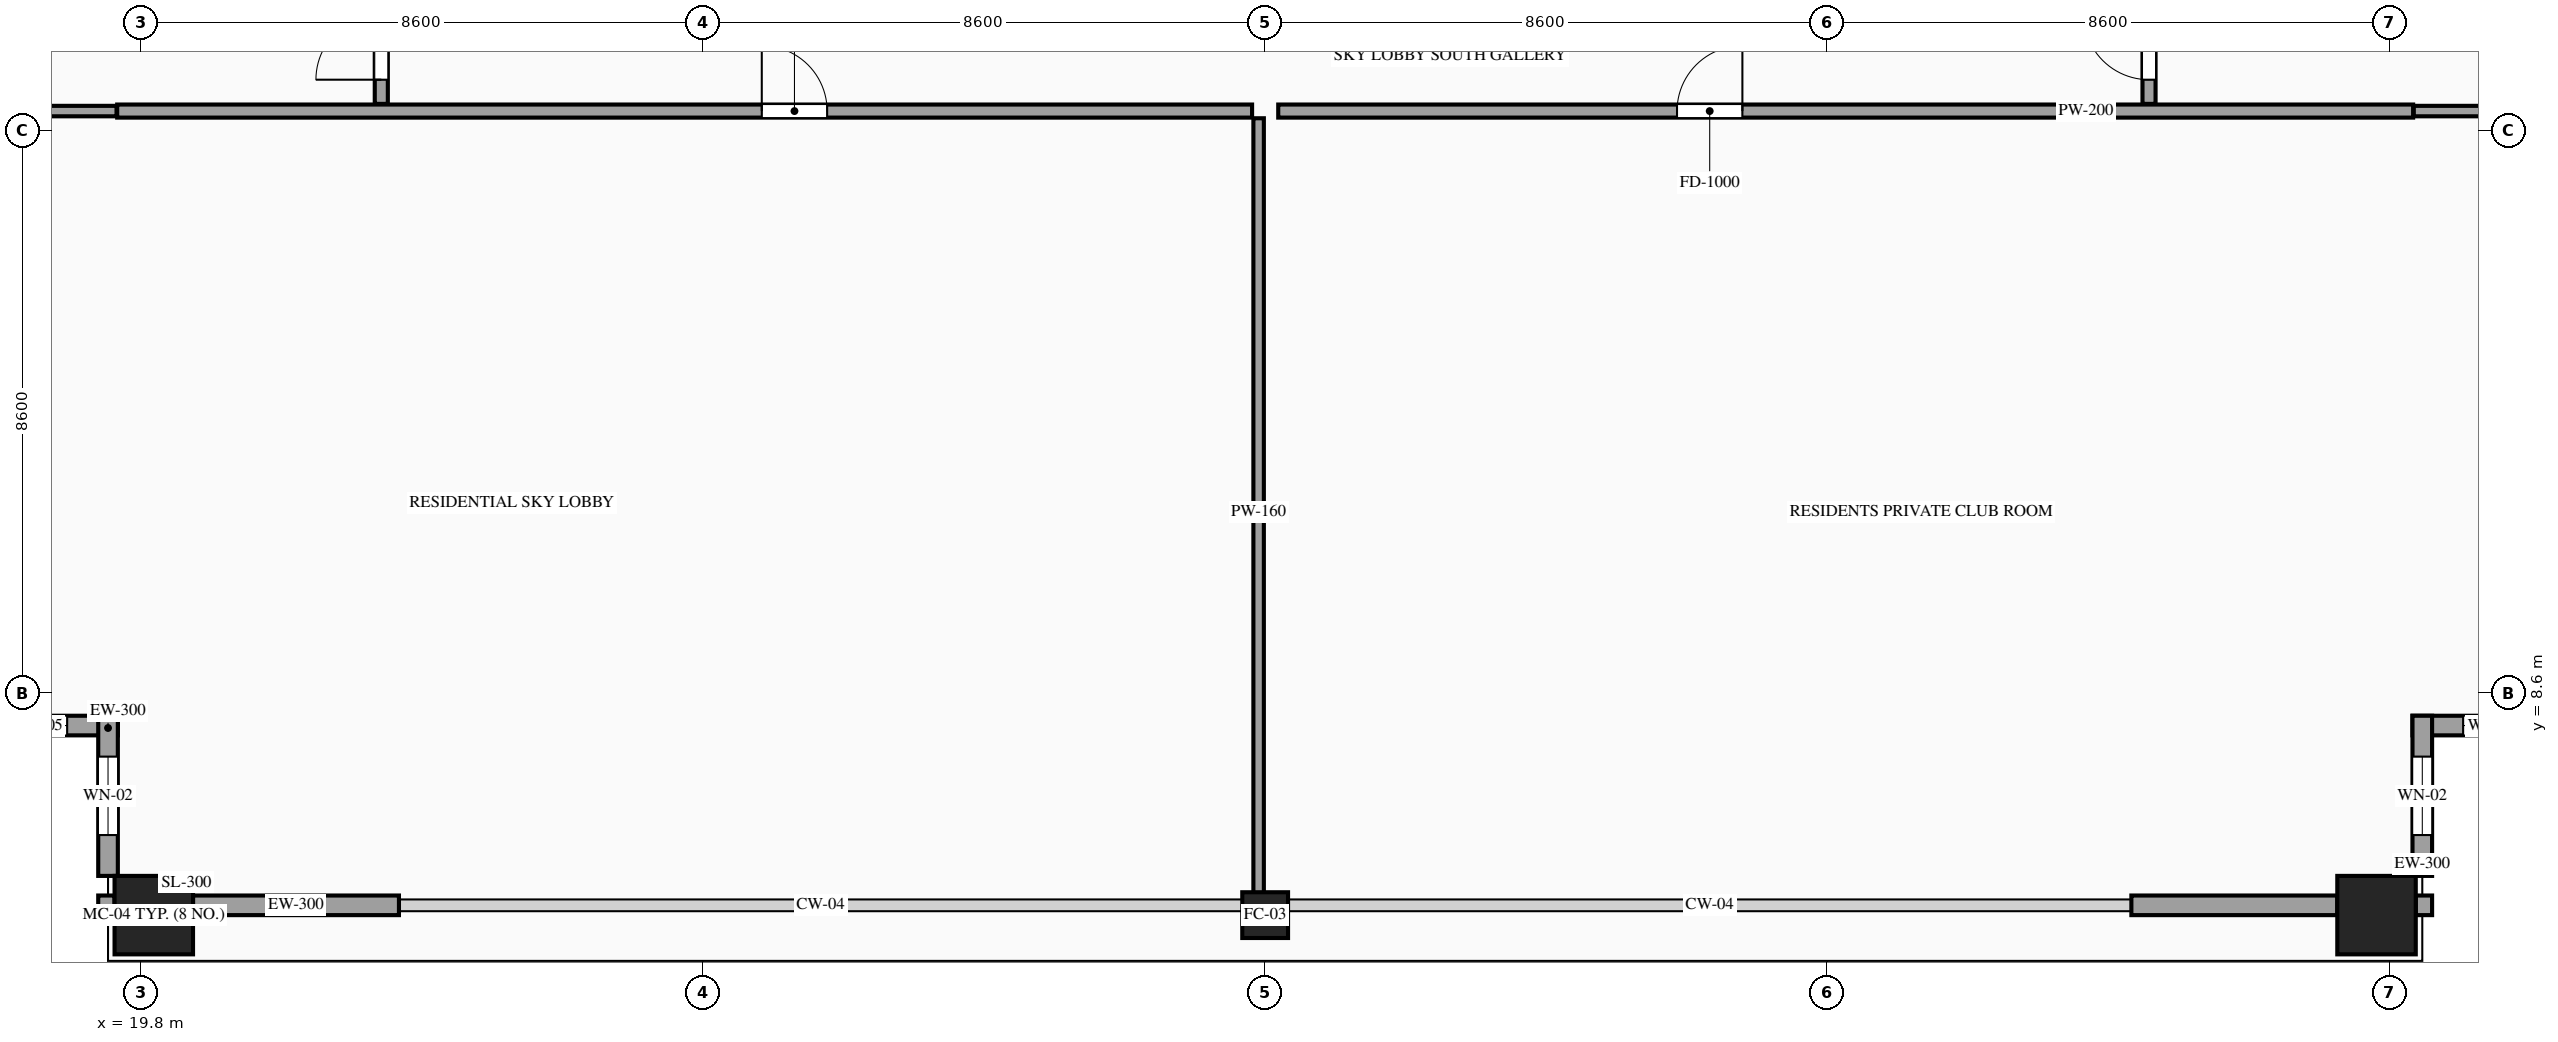
"""IFC4 building model, lengths in metres.
Left out: names, types, materials, properties, quantities, classifications, styles, units other than length and angle.
Written with IfcOpenShell. Run it as: python <this file> out.ifc"""

import sys

from ifc_helpers import new_model, si_unit, direction, frame, frame_2d, origin, origin_2d, place, context, subcontext, project, spatial, rectangle, hollow_rectangle, extrude, source, transform, mapped, element, fill, save


model = new_model("IFC4")
c1 = context("Model", 3, precision=1e-05, world=origin(), true_north=direction((0.0, 1.0)))
c2 = subcontext(c1, "Body", "Model", "MODEL_VIEW")
j1 = project(units=[si_unit("LENGTHUNIT", "METRE"), si_unit("PLANEANGLEUNIT", "RADIAN")], contexts=[c1])
p1 = place(None, origin())
s1 = spatial("IfcSite", under=j1, at=p1, CompositionType="ELEMENT")
p2 = place(p1, origin())
s2 = spatial("IfcBuilding", under=s1, at=p2, CompositionType="ELEMENT")
p3 = place(p2, frame((0.0, 0.0, 259.1)))
s3 = spatial("IfcBuildingStorey", under=s2, at=p3, CompositionType="ELEMENT", Elevation=259.1)
m1 = source(origin(), c2, "Body", "SweptSolid", [
    extrude(hollow_rectangle(XDim=1.2, YDim=1.2, WallThickness=0.055, at=origin_2d()), origin(), (0.0, 0.0, 1.0), 4.4),
])
p4 = place(p3, frame((20.0, 5.2, 0.0), z_axis=(0.0, 0.0, 1.0), x_axis=(1.0, 0.0, 0.0)))
e1 = element("IfcColumn", 1, at=p4, inside=s3, PredefinedType="COLUMN", context=c2, shape_type="MappedRepresentation", body=[
    mapped(m1, transform((0.0, 0.0, 0.0), scale=1.0)),
])
m2 = source(origin(), c2, "Body", "SweptSolid", [
    extrude(hollow_rectangle(XDim=0.7, YDim=0.7, WallThickness=0.032, at=origin_2d()), origin(), (0.0, 0.0, 1.0), 4.4),
])
p5 = place(p3, frame((37.0, 5.2, 0.0), z_axis=(0.0, 0.0, 1.0), x_axis=(1.0, 0.0, 0.0)))
e2 = element("IfcColumn", 2, at=p5, inside=s3, PredefinedType="COLUMN", context=c2, shape_type="MappedRepresentation", body=[
    mapped(m2, transform((0.0, 0.0, 0.0), scale=1.0)),
])
p6 = place(p3, frame((54.0, 5.2, 0.0), z_axis=(0.0, 0.0, 1.0), x_axis=(1.0, 0.0, 0.0)))
e3 = element("IfcColumn", 3, at=p6, inside=s3, PredefinedType="COLUMN", context=c2, shape_type="MappedRepresentation", body=[
    mapped(m1, transform((0.0, 0.0, 0.0), scale=1.0)),
])
p7 = place(p3, frame((17.0, 8.1, 0.0), z_axis=(0.0, 0.0, 1.0), x_axis=(1.0, 0.0, 0.0)))
e4 = element("IfcWall", 4, at=p7, inside=s3, PredefinedType="SOLIDWALL", context=c2, shape_type="SweptSolid", body=[
    extrude(rectangle(XDim=2.45, YDim=0.3, at=frame_2d((1.225, 0.0))), origin(), (0.0, 0.0, 1.0), 4.12),
])
p8 = place(p7, frame((0.775, 0.0, 0.85)))
e5 = element("IfcOpeningElement", 5, at=p8, cuts=e4, PredefinedType="OPENING", context=c2, shape_type="SweptSolid", body=[
    extrude(rectangle(XDim=0.9, YDim=1.5, at=frame_2d((0.45, 0.75))), frame((0.0, 0.165, 0.0), z_axis=(0.0, -1.0, 0.0), x_axis=(1.0, 0.0, 0.0)), (0.0, 0.0, 1.0), 0.33),
])
p9 = place(p3, frame((19.3, 8.25, 0.0), z_axis=(0.0, 0.0, 1.0), x_axis=(0.0, -1.0, 0.0)))
e6 = element("IfcWall", 6, at=p9, inside=s3, PredefinedType="SOLIDWALL", context=c2, shape_type="SweptSolid", body=[
    extrude(rectangle(XDim=2.45, YDim=0.3, at=frame_2d((1.225, 0.0))), origin(), (0.0, 0.0, 1.0), 4.12),
])
p10 = place(p9, frame((0.625, 0.0, 0.85)))
e7 = element("IfcOpeningElement", 7, at=p10, cuts=e6, PredefinedType="OPENING", context=c2, shape_type="SweptSolid", body=[
    extrude(rectangle(XDim=1.2, YDim=2.1, at=frame_2d((0.6, 1.05))), frame((0.0, 0.165, 0.0), z_axis=(0.0, -1.0, 0.0), x_axis=(1.0, 0.0, 0.0)), (0.0, 0.0, 1.0), 0.33),
])
p11 = place(p3, frame((54.55, 8.1, 0.0), z_axis=(0.0, 0.0, 1.0), x_axis=(1.0, 0.0, 0.0)))
e8 = element("IfcWall", 8, at=p11, inside=s3, PredefinedType="SOLIDWALL", context=c2, shape_type="SweptSolid", body=[
    extrude(rectangle(XDim=2.45, YDim=0.3, at=frame_2d((1.225, 0.0))), origin(), (0.0, 0.0, 1.0), 4.12),
])
p12 = place(p11, frame((0.775, 0.0, 0.85)))
e9 = element("IfcOpeningElement", 9, at=p12, cuts=e8, PredefinedType="OPENING", context=c2, shape_type="SweptSolid", body=[
    extrude(rectangle(XDim=0.9, YDim=1.5, at=frame_2d((0.45, 0.75))), frame((0.0, 0.165, 0.0), z_axis=(0.0, -1.0, 0.0), x_axis=(1.0, 0.0, 0.0)), (0.0, 0.0, 1.0), 0.33),
])
p13 = place(p3, frame((54.7, 5.8, 0.0), z_axis=(0.0, 0.0, 1.0), x_axis=(0.0, 1.0, 0.0)))
e10 = element("IfcWall", 10, at=p13, inside=s3, PredefinedType="SOLIDWALL", context=c2, shape_type="SweptSolid", body=[
    extrude(rectangle(XDim=2.45, YDim=0.3, at=frame_2d((1.225, 0.0))), origin(), (0.0, 0.0, 1.0), 4.12),
])
p14 = place(p13, frame((0.625, 0.0, 0.85)))
e11 = element("IfcOpeningElement", 11, at=p14, cuts=e10, PredefinedType="OPENING", context=c2, shape_type="SweptSolid", body=[
    extrude(rectangle(XDim=1.2, YDim=2.1, at=frame_2d((0.6, 1.05))), frame((0.0, 0.165, 0.0), z_axis=(0.0, -1.0, 0.0), x_axis=(1.0, 0.0, 0.0)), (0.0, 0.0, 1.0), 0.33),
])
m3 = source(origin(), c2, "Body", "SweptSolid", [
    extrude(rectangle(XDim=0.25, YDim=0.3, at=frame_2d((0.125, 0.0))), origin(), (0.0, 0.0, 1.0), 4.12),
])
for number, where, z_axis, x_axis in (
    (12, (19.15, 5.35, 0.0), (0.0, 0.0, 1.0), (1.0, 0.0, 0.0)),
    (13, (54.6, 5.35, 0.0), (0.0, 0.0, 1.0), (1.0, 0.0, 0.0)),
):
    element("IfcWall", number, at=place(p3, frame(where, z_axis=z_axis, x_axis=x_axis)), inside=s3, PredefinedType="SOLIDWALL", context=c2, shape_type="MappedRepresentation", body=[
        mapped(m3, transform((0.0, 0.0, 0.0), scale=1.0)),
    ])
m4 = source(origin(), c2, "Body", "SweptSolid", [
    extrude(rectangle(XDim=3.15, YDim=0.3, at=frame_2d((1.575, 0.0))), origin(), (0.0, 0.0, 1.0), 3.675),
])
for number, where, z_axis, x_axis in (
    (14, (20.6, 5.35, 0.0), (0.0, 0.0, 1.0), (1.0, 0.0, 0.0)),
    (15, (50.25, 5.35, 0.0), (0.0, 0.0, 1.0), (1.0, 0.0, 0.0)),
):
    element("IfcWall", number, at=place(p3, frame(where, z_axis=z_axis, x_axis=x_axis)), inside=s3, PredefinedType="SOLIDWALL", context=c2, shape_type="MappedRepresentation", body=[
        mapped(m4, transform((0.0, 0.0, 0.0), scale=1.0)),
    ])
p15 = place(p3, frame((19.44, 17.5, 0.0), z_axis=(0.0, 0.0, 1.0), x_axis=(1.0, 0.0, 0.0)))
e16 = element("IfcWall", 16, at=p15, inside=s3, PredefinedType="PARTITIONING", context=c2, shape_type="SweptSolid", body=[
    extrude(rectangle(XDim=17.36, YDim=0.2, at=frame_2d((8.68, 0.0))), origin(), (0.0, 0.0, 1.0), 4.12),
])
p16 = place(p15, frame((9.86, 0.0, 0.0)))
e17 = element("IfcOpeningElement", 17, at=p16, cuts=e16, PredefinedType="OPENING", context=c2, shape_type="SweptSolid", body=[
    extrude(rectangle(XDim=1.0, YDim=2.2, at=frame_2d((0.5, 1.1))), frame((0.0, 0.115, 0.0), z_axis=(0.0, -1.0, 0.0), x_axis=(1.0, 0.0, 0.0)), (0.0, 0.0, 1.0), 0.23),
])
m5 = source(origin(), c2, "Body", "SweptSolid", [
    extrude(rectangle(XDim=12.04, YDim=0.16, at=frame_2d((6.02, 0.0))), origin(), (0.0, 0.0, 1.0), 3.627),
])
p17 = place(p3, frame((36.9, 5.35, 0.0), z_axis=(0.0, 0.0, 1.0), x_axis=(0.0, 1.0, 0.0)))
e18 = element("IfcWall", 18, at=p17, inside=s3, PredefinedType="PARTITIONING", context=c2, shape_type="MappedRepresentation", body=[
    mapped(m5, transform((0.0, 0.0, 0.0), scale=1.0)),
])
p18 = place(p3, frame((37.2, 17.5, 0.0), z_axis=(0.0, 0.0, 1.0), x_axis=(1.0, 0.0, 0.0)))
e19 = element("IfcWall", 19, at=p18, inside=s3, PredefinedType="PARTITIONING", context=c2, shape_type="SweptSolid", body=[
    extrude(rectangle(XDim=17.36, YDim=0.2, at=frame_2d((8.68, 0.0))), origin(), (0.0, 0.0, 1.0), 4.12),
])
p19 = place(p18, frame((6.1, 0.0, 0.0)))
e20 = element("IfcOpeningElement", 20, at=p19, cuts=e19, PredefinedType="OPENING", context=c2, shape_type="SweptSolid", body=[
    extrude(rectangle(XDim=1.0, YDim=2.2, at=frame_2d((0.5, 1.1))), frame((0.0, 0.115, 0.0), z_axis=(0.0, -1.0, 0.0), x_axis=(1.0, 0.0, 0.0)), (0.0, 0.0, 1.0), 0.23),
])
p20 = place(p3, frame((23.48, 17.61, 0.0), z_axis=(0.0, 0.0, 1.0), x_axis=(0.0, 1.0, 0.0)))
e21 = element("IfcWall", 21, at=p20, inside=s3, PredefinedType="PARTITIONING", context=c2, shape_type="SweptSolid", body=[
    extrude(rectangle(XDim=1.74, YDim=0.2, at=frame_2d((0.87, 0.0))), origin(), (0.0, 0.0, 1.0), 4.12),
])
p21 = place(p20, frame((0.37, 0.0, 0.0)))
e22 = element("IfcOpeningElement", 22, at=p21, cuts=e21, PredefinedType="OPENING", context=c2, shape_type="SweptSolid", body=[
    extrude(rectangle(XDim=1.0, YDim=2.2, at=frame_2d((0.5, 1.1))), frame((0.0, 0.115, 0.0), z_axis=(0.0, -1.0, 0.0), x_axis=(1.0, 0.0, 0.0)), (0.0, 0.0, 1.0), 0.23),
])
m6 = source(origin(), c2, "Body", "SweptSolid", [
    extrude(rectangle(XDim=2.88, YDim=0.16, at=frame_2d((1.44, 0.0))), origin(), (0.0, 0.0, 1.0), 4.12),
])
p22 = place(p3, frame((16.55, 17.5, 0.0), z_axis=(0.0, 0.0, 1.0), x_axis=(1.0, 0.0, 0.0)))
e23 = element("IfcWall", 23, at=p22, inside=s3, PredefinedType="PARTITIONING", context=c2, shape_type="MappedRepresentation", body=[
    mapped(m6, transform((0.0, 0.0, 0.0), scale=1.0)),
])
p23 = place(p3, frame((50.52, 17.61, 0.0), z_axis=(0.0, 0.0, 1.0), x_axis=(0.0, 1.0, 0.0)))
e24 = element("IfcWall", 24, at=p23, inside=s3, PredefinedType="PARTITIONING", context=c2, shape_type="SweptSolid", body=[
    extrude(rectangle(XDim=1.74, YDim=0.2, at=frame_2d((0.87, 0.0))), origin(), (0.0, 0.0, 1.0), 4.12),
])
p24 = place(p23, frame((0.37, 0.0, 0.0)))
e25 = element("IfcOpeningElement", 25, at=p24, cuts=e24, PredefinedType="OPENING", context=c2, shape_type="SweptSolid", body=[
    extrude(rectangle(XDim=1.0, YDim=2.2, at=frame_2d((0.5, 1.1))), frame((0.0, 0.115, 0.0), z_axis=(0.0, -1.0, 0.0), x_axis=(1.0, 0.0, 0.0)), (0.0, 0.0, 1.0), 0.23),
])
p25 = place(p3, frame((54.57, 17.5, 0.0), z_axis=(0.0, 0.0, 1.0), x_axis=(1.0, 0.0, 0.0)))
e26 = element("IfcWall", 26, at=p25, inside=s3, PredefinedType="PARTITIONING", context=c2, shape_type="MappedRepresentation", body=[
    mapped(m6, transform((0.0, 0.0, 0.0), scale=1.0)),
])
m7 = source(origin(), c2, "Body", "SweptSolid", [
    extrude(rectangle(XDim=0.9, YDim=1.5, at=frame_2d((0.45, 0.75))), frame((0.0, 0.03, 0.0), z_axis=(0.0, -1.0, 0.0), x_axis=(1.0, 0.0, 0.0)), (0.0, 0.0, 1.0), 0.06),
])
p26 = place(p8, origin())
e27 = element("IfcWindow", 27, at=p26, inside=s3, PartitioningType="SINGLE_PANEL", PredefinedType="WINDOW", context=c2, shape_type="MappedRepresentation", body=[
    mapped(m7, transform((0.0, 0.0, 0.0), scale=1.0)),
])
fill(e5, e27)
m8 = source(origin(), c2, "Body", "SweptSolid", [
    extrude(rectangle(XDim=1.2, YDim=2.1, at=frame_2d((0.6, 1.05))), frame((0.0, 0.03, 0.0), z_axis=(0.0, -1.0, 0.0), x_axis=(1.0, 0.0, 0.0)), (0.0, 0.0, 1.0), 0.06),
])
p27 = place(p10, origin())
e28 = element("IfcWindow", 28, at=p27, inside=s3, PartitioningType="SINGLE_PANEL", PredefinedType="WINDOW", context=c2, shape_type="MappedRepresentation", body=[
    mapped(m8, transform((0.0, 0.0, 0.0), scale=1.0)),
])
fill(e7, e28)
p28 = place(p12, origin())
e29 = element("IfcWindow", 29, at=p28, inside=s3, PartitioningType="SINGLE_PANEL", PredefinedType="WINDOW", context=c2, shape_type="MappedRepresentation", body=[
    mapped(m7, transform((0.0, 0.0, 0.0), scale=1.0)),
])
fill(e9, e29)
p29 = place(p14, origin())
e30 = element("IfcWindow", 30, at=p29, inside=s3, PartitioningType="SINGLE_PANEL", PredefinedType="WINDOW", context=c2, shape_type="MappedRepresentation", body=[
    mapped(m8, transform((0.0, 0.0, 0.0), scale=1.0)),
])
fill(e11, e30)
m9 = source(origin(), c2, "Body", "SweptSolid", [
    extrude(rectangle(XDim=1.0, YDim=2.2, at=frame_2d((0.5, 1.1))), frame((0.0, 0.025, 0.0), z_axis=(0.0, -1.0, 0.0), x_axis=(1.0, 0.0, 0.0)), (0.0, 0.0, 1.0), 0.05),
])
p30 = place(p16, origin())
e31 = element("IfcDoor", 31, at=p30, inside=s3, OperationType="SINGLE_SWING_LEFT", PredefinedType="DOOR", context=c2, shape_type="MappedRepresentation", body=[
    mapped(m9, transform((0.0, 0.0, 0.0), scale=1.0)),
])
fill(e17, e31)
p31 = place(p19, origin())
e32 = element("IfcDoor", 32, at=p31, inside=s3, OperationType="SINGLE_SWING_RIGHT", PredefinedType="DOOR", context=c2, shape_type="MappedRepresentation", body=[
    mapped(m9, transform((0.0, 0.0, 0.0), scale=1.0)),
])
fill(e20, e32)
p32 = place(p21, origin())
e33 = element("IfcDoor", 33, at=p32, inside=s3, OperationType="SINGLE_SWING_LEFT", PredefinedType="DOOR", context=c2, shape_type="MappedRepresentation", body=[
    mapped(m9, transform((0.0, 0.0, 0.0), scale=1.0)),
])
fill(e22, e33)
p33 = place(p24, origin())
e34 = element("IfcDoor", 34, at=p33, inside=s3, OperationType="SINGLE_SWING_RIGHT", PredefinedType="DOOR", context=c2, shape_type="MappedRepresentation", body=[
    mapped(m9, transform((0.0, 0.0, 0.0), scale=1.0)),
])
fill(e25, e34)
save(model, sys.argv[1])
